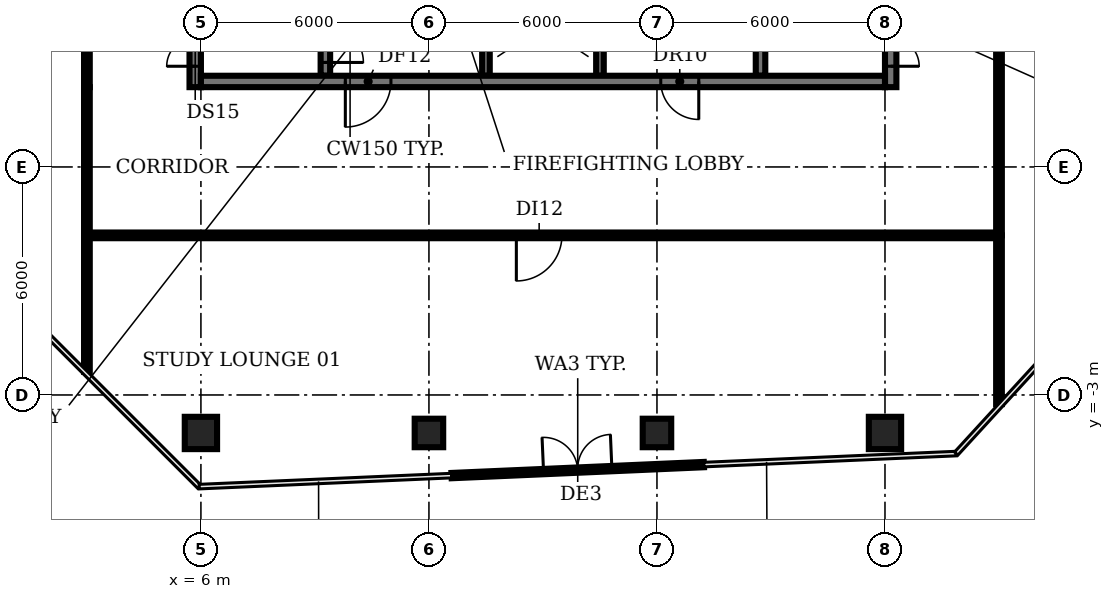
"""IFC4 building model, lengths in metres.
Left out: names, types, materials, properties, quantities, classifications, styles, units other than length and angle.
Written with IfcOpenShell. Run it as: python <this file> out.ifc"""

import sys

from ifc_helpers import new_model, si_unit, direction, frame, frame_2d, origin, origin_2d, place, context, subcontext, project, spatial, rectangle, circle, extrude, element, fill, save


model = new_model("IFC4")
c1 = context("Model", 3, precision=1e-05, world=origin(), true_north=direction((0.0, 1.0)))
c2 = subcontext(c1, "Body", "Model", "MODEL_VIEW")
j1 = project(units=[si_unit("LENGTHUNIT", "METRE"), si_unit("PLANEANGLEUNIT", "RADIAN")], contexts=[c1])
p1 = place(None, origin())
s1 = spatial("IfcSite", under=j1, at=p1, CompositionType="ELEMENT")
p2 = place(p1, origin())
s2 = spatial("IfcBuilding", under=s1, at=p2, CompositionType="ELEMENT")
p3 = place(p2, frame((0.0, 0.0, 297.8)))
s3 = spatial("IfcBuildingStorey", under=s2, at=p3, CompositionType="ELEMENT", Elevation=297.8)
p4 = place(p3, frame((6.0, -4.0, 0.0), z_axis=(0.0, 0.0, 1.0), x_axis=(1.0, 0.0, 0.0)))
e1 = element("IfcColumn", 1, at=p4, inside=s3, PredefinedType="COLUMN", context=c2, shape_type="SweptSolid", body=[
    extrude(circle(Radius=0.425, at=origin_2d()), origin(), (0.0, 0.0, 1.0), 3.85),
])
for number, where, z_axis, x_axis in (
    (2, (12.0, -4.0, 0.0), (0.0, 0.0, 1.0), (1.0, 0.0, 0.0)),
    (3, (18.0, -4.0, 0.0), (0.0, 0.0, 1.0), (1.0, 0.0, 0.0)),
):
    element("IfcColumn", number, at=place(p3, frame(where, z_axis=z_axis, x_axis=x_axis)), inside=s3, PredefinedType="COLUMN", context=c2, shape_type="SweptSolid", body=[
        extrude(rectangle(XDim=0.75, YDim=0.75, at=origin_2d()), origin(), (0.0, 0.0, 1.0), 3.85),
    ])
p5 = place(p3, frame((24.0, -4.0, 0.0), z_axis=(0.0, 0.0, 1.0), x_axis=(1.0, 0.0, 0.0)))
e4 = element("IfcColumn", 4, at=p5, inside=s3, PredefinedType="COLUMN", context=c2, shape_type="SweptSolid", body=[
    extrude(circle(Radius=0.425, at=origin_2d()), origin(), (0.0, 0.0, 1.0), 3.85),
])
p6 = place(p3, frame((12.595, -5.122, 0.0), z_axis=(0.0, 0.0, 1.0), x_axis=(0.999047265648, 0.043641276349, 0.0)))
e5 = element("IfcWall", 5, at=p6, inside=s3, PredefinedType="SOLIDWALL", context=c2, shape_type="SweptSolid", body=[
    extrude(rectangle(XDim=6.646, YDim=0.14, at=frame_2d((3.323, 0.0))), origin(), (0.0, 0.0, 1.0), 3.85),
])
p7 = place(p6, frame((2.423, 0.0, 0.0)))
e6 = element("IfcOpeningElement", 6, at=p7, cuts=e5, PredefinedType="OPENING", context=c2, shape_type="SweptSolid", body=[
    extrude(rectangle(XDim=1.8, YDim=2.4, at=frame_2d((0.9, 1.2))), frame((0.0, 0.08, 0.0), z_axis=(0.0, -1.0, 0.0), x_axis=(1.0, 0.0, 0.0)), (0.0, 0.0, 1.0), 0.16),
])
p8 = place(p3, frame((9.275, 11.825, 0.0), z_axis=(0.0, 0.0, 1.0), x_axis=(0.0, -1.0, 0.0)))
e7 = element("IfcWall", 7, at=p8, inside=s3, PredefinedType="SHEAR", context=c2, shape_type="SweptSolid", body=[
    extrude(rectangle(XDim=6.425, YDim=0.25, at=frame_2d((3.212, 0.0))), origin(), (0.0, 0.0, 1.0), 3.85),
])
p9 = place(p8, frame((5.075, 0.0, 0.0)))
e8 = element("IfcOpeningElement", 8, at=p9, cuts=e7, PredefinedType="OPENING", context=c2, shape_type="SweptSolid", body=[
    extrude(rectangle(XDim=1.0, YDim=2.1, at=frame_2d((0.5, 1.05))), frame((0.0, 0.135, 0.0), z_axis=(0.0, -1.0, 0.0), x_axis=(1.0, 0.0, 0.0)), (0.0, 0.0, 1.0), 0.27),
])
p10 = place(p3, frame((13.5, 5.4, 0.0), z_axis=(0.0, 0.0, 1.0), x_axis=(0.0, 1.0, 0.0)))
e9 = element("IfcWall", 9, at=p10, inside=s3, PredefinedType="SHEAR", context=c2, shape_type="SweptSolid", body=[
    extrude(rectangle(XDim=8.2, YDim=0.2, at=frame_2d((4.1, 0.0))), origin(), (0.0, 0.0, 1.0), 3.85),
])
p11 = place(p10, frame((0.75, 0.0, 0.0)))
e10 = element("IfcOpeningElement", 10, at=p11, cuts=e9, PredefinedType="OPENING", context=c2, shape_type="SweptSolid", body=[
    extrude(rectangle(XDim=1.1, YDim=2.1, at=frame_2d((0.55, 1.05))), frame((0.0, 0.11, 0.0), z_axis=(0.0, -1.0, 0.0), x_axis=(1.0, 0.0, 0.0)), (0.0, 0.0, 1.0), 0.22),
])
p12 = place(p10, frame((3.55, 0.0, 0.0)))
e11 = element("IfcOpeningElement", 11, at=p12, cuts=e9, PredefinedType="OPENING", context=c2, shape_type="SweptSolid", body=[
    extrude(rectangle(XDim=1.1, YDim=2.1, at=frame_2d((0.55, 1.05))), frame((0.0, 0.11, 0.0), z_axis=(0.0, -1.0, 0.0), x_axis=(1.0, 0.0, 0.0)), (0.0, 0.0, 1.0), 0.22),
])
p13 = place(p10, frame((6.35, 0.0, 0.0)))
e12 = element("IfcOpeningElement", 12, at=p13, cuts=e9, PredefinedType="OPENING", context=c2, shape_type="SweptSolid", body=[
    extrude(rectangle(XDim=1.1, YDim=2.1, at=frame_2d((0.55, 1.05))), frame((0.0, 0.11, 0.0), z_axis=(0.0, -1.0, 0.0), x_axis=(1.0, 0.0, 0.0)), (0.0, 0.0, 1.0), 0.22),
])
p14 = place(p3, frame((16.5, 5.4, 0.0), z_axis=(0.0, 0.0, 1.0), x_axis=(0.0, 1.0, 0.0)))
e13 = element("IfcWall", 13, at=p14, inside=s3, PredefinedType="SHEAR", context=c2, shape_type="SweptSolid", body=[
    extrude(rectangle(XDim=8.2, YDim=0.2, at=frame_2d((4.1, 0.0))), origin(), (0.0, 0.0, 1.0), 3.85),
])
p15 = place(p3, frame((20.725, 5.4, 0.0), z_axis=(0.0, 0.0, 1.0), x_axis=(0.0, 1.0, 0.0)))
e14 = element("IfcWall", 14, at=p15, inside=s3, PredefinedType="SHEAR", context=c2, shape_type="SweptSolid", body=[
    extrude(rectangle(XDim=6.3, YDim=0.25, at=frame_2d((3.15, 0.0))), origin(), (0.0, 0.0, 1.0), 3.85),
])
p16 = place(p3, frame((5.85, 5.1, 0.0), z_axis=(0.0, 0.0, 1.0), x_axis=(0.0, 1.0, 0.0)))
e15 = element("IfcWall", 15, at=p16, inside=s3, PredefinedType="SHEAR", context=c2, shape_type="SweptSolid", body=[
    extrude(rectangle(XDim=20.0, YDim=0.3, at=frame_2d((10.0, 0.0))), origin(), (0.0, 0.0, 1.0), 3.85),
])
p17 = place(p16, frame((0.55, 0.0, 0.0)))
e16 = element("IfcOpeningElement", 16, at=p17, cuts=e15, PredefinedType="OPENING", context=c2, shape_type="SweptSolid", body=[
    extrude(rectangle(XDim=1.5, YDim=2.1, at=frame_2d((0.75, 1.05))), frame((0.0, 0.16, 0.0), z_axis=(0.0, -1.0, 0.0), x_axis=(1.0, 0.0, 0.0)), (0.0, 0.0, 1.0), 0.32),
])
p18 = place(p16, frame((7.0, 0.0, 0.0)))
e17 = element("IfcOpeningElement", 17, at=p18, cuts=e15, PredefinedType="OPENING", context=c2, shape_type="SweptSolid", body=[
    extrude(rectangle(XDim=1.2, YDim=2.1, at=frame_2d((0.6, 1.05))), frame((0.0, 0.16, 0.0), z_axis=(0.0, -1.0, 0.0), x_axis=(1.0, 0.0, 0.0)), (0.0, 0.0, 1.0), 0.32),
])
p19 = place(p16, frame((13.55, 0.0, 0.0)))
e18 = element("IfcOpeningElement", 18, at=p19, cuts=e15, PredefinedType="OPENING", context=c2, shape_type="SweptSolid", body=[
    extrude(rectangle(XDim=1.2, YDim=2.1, at=frame_2d((0.6, 1.05))), frame((0.0, 0.16, 0.0), z_axis=(0.0, -1.0, 0.0), x_axis=(1.0, 0.0, 0.0)), (0.0, 0.0, 1.0), 0.32),
])
p20 = place(p3, frame((24.15, 25.655, 0.0), z_axis=(0.0, 0.0, 1.0), x_axis=(0.0, -1.0, 0.0)))
e19 = element("IfcWall", 19, at=p20, inside=s3, PredefinedType="SHEAR", context=c2, shape_type="SweptSolid", body=[
    extrude(rectangle(XDim=20.555, YDim=0.3, at=frame_2d((10.277, 0.0))), origin(), (0.0, 0.0, 1.0), 3.85),
])
p21 = place(p20, frame((18.505, 0.0, 0.0)))
e20 = element("IfcOpeningElement", 20, at=p21, cuts=e19, PredefinedType="OPENING", context=c2, shape_type="SweptSolid", body=[
    extrude(rectangle(XDim=1.5, YDim=2.1, at=frame_2d((0.75, 1.05))), frame((0.0, 0.16, 0.0), z_axis=(0.0, -1.0, 0.0), x_axis=(1.0, 0.0, 0.0)), (0.0, 0.0, 1.0), 0.32),
])
p22 = place(p20, frame((12.405, 0.0, 0.0)))
e21 = element("IfcOpeningElement", 21, at=p22, cuts=e19, PredefinedType="OPENING", context=c2, shape_type="SweptSolid", body=[
    extrude(rectangle(XDim=0.9, YDim=2.1, at=frame_2d((0.45, 1.05))), frame((0.0, 0.16, 0.0), z_axis=(0.0, -1.0, 0.0), x_axis=(1.0, 0.0, 0.0)), (0.0, 0.0, 1.0), 0.32),
])
p23 = place(p20, frame((6.405, 0.0, 0.0)))
e22 = element("IfcOpeningElement", 22, at=p23, cuts=e19, PredefinedType="OPENING", context=c2, shape_type="SweptSolid", body=[
    extrude(rectangle(XDim=2.0, YDim=2.1, at=frame_2d((1.0, 1.05))), frame((0.0, 0.16, 0.0), z_axis=(0.0, -1.0, 0.0), x_axis=(1.0, 0.0, 0.0)), (0.0, 0.0, 1.0), 0.32),
])
p24 = place(p3, frame((24.0, 5.25, 0.0), z_axis=(0.0, 0.0, 1.0), x_axis=(-1.0, 0.0, 0.0)))
e23 = element("IfcWall", 23, at=p24, inside=s3, PredefinedType="SHEAR", context=c2, shape_type="SweptSolid", body=[
    extrude(rectangle(XDim=18.0, YDim=0.3, at=frame_2d((9.0, 0.0))), origin(), (0.0, 0.0, 1.0), 3.85),
])
p25 = place(p24, frame((13.0, 0.0, 0.0)))
e24 = element("IfcOpeningElement", 24, at=p25, cuts=e23, PredefinedType="OPENING", context=c2, shape_type="SweptSolid", body=[
    extrude(rectangle(XDim=1.2, YDim=2.1, at=frame_2d((0.6, 1.05))), frame((0.0, 0.16, 0.0), z_axis=(0.0, -1.0, 0.0), x_axis=(1.0, 0.0, 0.0)), (0.0, 0.0, 1.0), 0.32),
])
p26 = place(p24, frame((4.9, 0.0, 0.0)))
e25 = element("IfcOpeningElement", 25, at=p26, cuts=e23, PredefinedType="OPENING", context=c2, shape_type="SweptSolid", body=[
    extrude(rectangle(XDim=1.0, YDim=2.1, at=frame_2d((0.5, 1.05))), frame((0.0, 0.16, 0.0), z_axis=(0.0, -1.0, 0.0), x_axis=(1.0, 0.0, 0.0)), (0.0, 0.0, 1.0), 0.32),
])
p27 = place(p3, frame((3.0, -2.39, 0.0), z_axis=(0.0, 0.0, 1.0), x_axis=(0.0, 1.0, 0.0)))
e26 = element("IfcWall", 26, at=p27, inside=s3, PredefinedType="PARTITIONING", context=c2, shape_type="SweptSolid", body=[
    extrude(rectangle(XDim=3.59, YDim=0.15, at=frame_2d((1.795, 0.0))), origin(), (0.0, 0.0, 1.0), 2.9),
])
p28 = place(p3, frame((3.0, 1.2, 0.0), z_axis=(0.0, 0.0, 1.0), x_axis=(0.0, 1.0, 0.0)))
e27 = element("IfcWall", 27, at=p28, inside=s3, PredefinedType="PARTITIONING", context=c2, shape_type="SweptSolid", body=[
    extrude(rectangle(XDim=3.9, YDim=0.15, at=frame_2d((1.95, 0.0))), origin(), (0.0, 0.0, 1.0), 2.9),
])
p29 = place(p3, frame((3.0, 5.1, 0.0), z_axis=(0.0, 0.0, 1.0), x_axis=(0.0, 1.0, 0.0)))
e28 = element("IfcWall", 28, at=p29, inside=s3, PredefinedType="PARTITIONING", context=c2, shape_type="SweptSolid", body=[
    extrude(rectangle(XDim=20.0, YDim=0.15, at=frame_2d((10.0, 0.0))), origin(), (0.0, 0.0, 1.0), 2.9),
])
p30 = place(p29, frame((9.3, 0.0, 0.0)))
e29 = element("IfcOpeningElement", 29, at=p30, cuts=e28, PredefinedType="OPENING", context=c2, shape_type="SweptSolid", body=[
    extrude(rectangle(XDim=1.2, YDim=2.1, at=frame_2d((0.6, 1.05))), frame((0.0, 0.085, 0.0), z_axis=(0.0, -1.0, 0.0), x_axis=(1.0, 0.0, 0.0)), (0.0, 0.0, 1.0), 0.17),
])
p31 = place(p3, frame((27.0, -3.24, 0.0), z_axis=(0.0, 0.0, 1.0), x_axis=(0.0, 1.0, 0.0)))
e30 = element("IfcWall", 30, at=p31, inside=s3, PredefinedType="PARTITIONING", context=c2, shape_type="SweptSolid", body=[
    extrude(rectangle(XDim=4.44, YDim=0.15, at=frame_2d((2.22, 0.0))), origin(), (0.0, 0.0, 1.0), 2.9),
])
p32 = place(p3, frame((27.0, 1.2, 0.0), z_axis=(0.0, 0.0, 1.0), x_axis=(-1.0, 0.0, 0.0)))
e31 = element("IfcWall", 31, at=p32, inside=s3, PredefinedType="PARTITIONING", context=c2, shape_type="SweptSolid", body=[
    extrude(rectangle(XDim=24.0, YDim=0.15, at=frame_2d((12.0, 0.0))), origin(), (0.0, 0.0, 1.0), 2.9),
])
p33 = place(p32, frame((11.5, 0.0, 0.0)))
e32 = element("IfcOpeningElement", 32, at=p33, cuts=e31, PredefinedType="OPENING", context=c2, shape_type="SweptSolid", body=[
    extrude(rectangle(XDim=1.2, YDim=2.1, at=frame_2d((0.6, 1.05))), frame((0.0, 0.085, 0.0), z_axis=(0.0, -1.0, 0.0), x_axis=(1.0, 0.0, 0.0)), (0.0, 0.0, 1.0), 0.17),
])
p34 = place(p3, frame((27.0, 1.2, 0.0), z_axis=(0.0, 0.0, 1.0), x_axis=(0.0, 1.0, 0.0)))
e33 = element("IfcWall", 33, at=p34, inside=s3, PredefinedType="PARTITIONING", context=c2, shape_type="SweptSolid", body=[
    extrude(rectangle(XDim=7.65, YDim=0.15, at=frame_2d((3.825, 0.0))), origin(), (0.0, 0.0, 1.0), 2.9),
])
p35 = place(p7, origin())
e34 = element("IfcDoor", 34, at=p35, inside=s3, OperationType="DOUBLE_DOOR_DOUBLE_SWING", PredefinedType="DOOR", context=c2, shape_type="SweptSolid", body=[
    extrude(rectangle(XDim=1.8, YDim=2.4, at=frame_2d((0.9, 1.2))), frame((0.0, 0.025, 0.0), z_axis=(0.0, -1.0, 0.0), x_axis=(1.0, 0.0, 0.0)), (0.0, 0.0, 1.0), 0.05),
])
fill(e6, e34)
p36 = place(p9, origin())
e35 = element("IfcDoor", 35, at=p36, inside=s3, OperationType="SINGLE_SWING_RIGHT", PredefinedType="DOOR", context=c2, shape_type="SweptSolid", body=[
    extrude(rectangle(XDim=1.0, YDim=2.1, at=frame_2d((0.5, 1.05))), frame((0.0, 0.025, 0.0), z_axis=(0.0, -1.0, 0.0), x_axis=(1.0, 0.0, 0.0)), (0.0, 0.0, 1.0), 0.05),
])
fill(e8, e35)
p37 = place(p17, origin())
e36 = element("IfcDoor", 36, at=p37, inside=s3, OperationType="DOUBLE_DOOR_SINGLE_SWING", PredefinedType="DOOR", context=c2, shape_type="SweptSolid", body=[
    extrude(rectangle(XDim=1.5, YDim=2.1, at=frame_2d((0.75, 1.05))), frame((0.0, 0.025, 0.0), z_axis=(0.0, -1.0, 0.0), x_axis=(1.0, 0.0, 0.0)), (0.0, 0.0, 1.0), 0.05),
])
fill(e16, e36)
p38 = place(p21, origin())
e37 = element("IfcDoor", 37, at=p38, inside=s3, OperationType="DOUBLE_DOOR_SINGLE_SWING", PredefinedType="DOOR", context=c2, shape_type="SweptSolid", body=[
    extrude(rectangle(XDim=1.5, YDim=2.1, at=frame_2d((0.75, 1.05))), frame((0.0, 0.025, 0.0), z_axis=(0.0, -1.0, 0.0), x_axis=(1.0, 0.0, 0.0)), (0.0, 0.0, 1.0), 0.05),
])
fill(e20, e37)
p39 = place(p25, origin())
e38 = element("IfcDoor", 38, at=p39, inside=s3, OperationType="SINGLE_SWING_RIGHT", PredefinedType="DOOR", context=c2, shape_type="SweptSolid", body=[
    extrude(rectangle(XDim=1.2, YDim=2.1, at=frame_2d((0.6, 1.05))), frame((0.0, 0.025, 0.0), z_axis=(0.0, -1.0, 0.0), x_axis=(1.0, 0.0, 0.0)), (0.0, 0.0, 1.0), 0.05),
])
fill(e24, e38)
p40 = place(p26, origin())
e39 = element("IfcDoor", 39, at=p40, inside=s3, OperationType="SINGLE_SWING_LEFT", PredefinedType="DOOR", context=c2, shape_type="SweptSolid", body=[
    extrude(rectangle(XDim=1.0, YDim=2.1, at=frame_2d((0.5, 1.05))), frame((0.0, 0.025, 0.0), z_axis=(0.0, -1.0, 0.0), x_axis=(1.0, 0.0, 0.0)), (0.0, 0.0, 1.0), 0.05),
])
fill(e25, e39)
p41 = place(p33, origin())
e40 = element("IfcDoor", 40, at=p41, inside=s3, OperationType="SINGLE_SWING_RIGHT", PredefinedType="DOOR", context=c2, shape_type="SweptSolid", body=[
    extrude(rectangle(XDim=1.2, YDim=2.1, at=frame_2d((0.6, 1.05))), frame((0.0, 0.025, 0.0), z_axis=(0.0, -1.0, 0.0), x_axis=(1.0, 0.0, 0.0)), (0.0, 0.0, 1.0), 0.05),
])
fill(e32, e40)
save(model, sys.argv[1])
